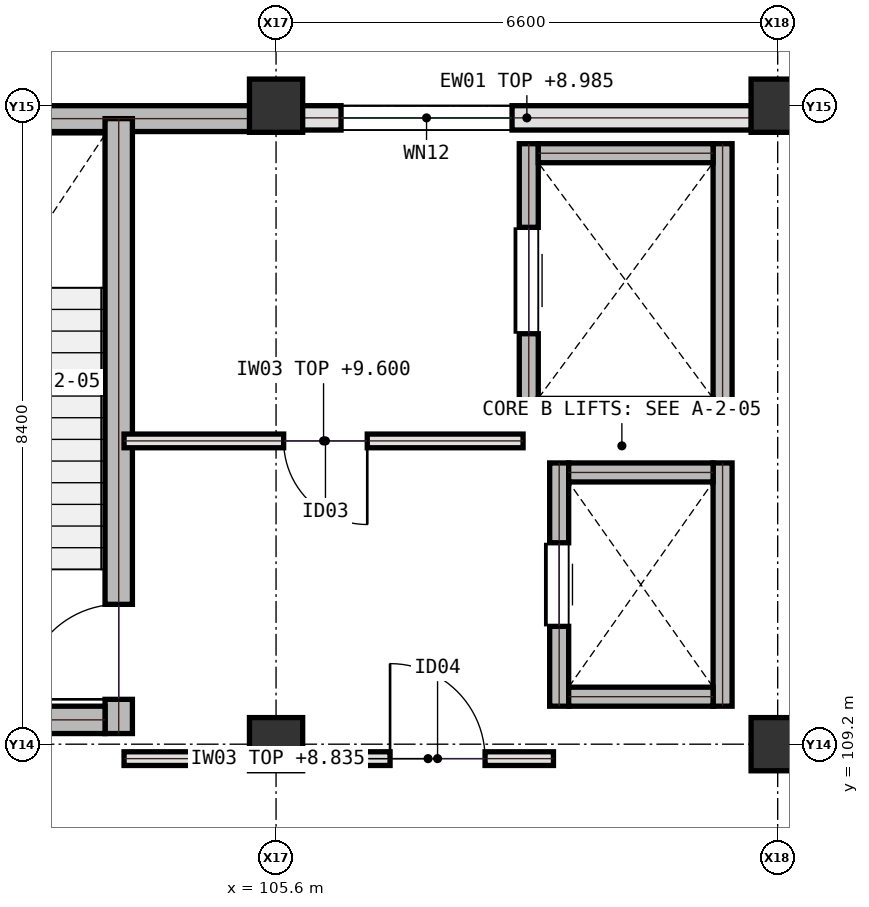
"""IFC4 building model, lengths in metres.
Left out: names, types, materials, properties, quantities, classifications, styles, units other than length and angle.
Written with IfcOpenShell. Run it as: python <this file> out.ifc"""

import sys

from ifc_helpers import new_model, si_unit, direction, frame, frame_2d, origin, origin_2d, place, context, subcontext, project, spatial, rectangle, extrude, element, fill, save


model = new_model("IFC4")
c1 = context("Model", 3, precision=1e-05, world=origin(), true_north=direction((0.0, 1.0)))
c2 = subcontext(c1, "Body", "Model", "MODEL_VIEW")
j1 = project(units=[si_unit("LENGTHUNIT", "METRE"), si_unit("PLANEANGLEUNIT", "RADIAN")], contexts=[c1])
p1 = place(None, origin())
s1 = spatial("IfcSite", under=j1, at=p1, CompositionType="ELEMENT")
p2 = place(p1, origin())
s2 = spatial("IfcBuilding", under=s1, at=p2, CompositionType="ELEMENT")
p3 = place(p2, frame((0.0, 0.0, 5.4)))
s3 = spatial("IfcBuildingStorey", under=s2, at=p3, CompositionType="ELEMENT", Elevation=5.4)
for number, where, z_axis, x_axis in (
    (1, (105.6, 109.2, 0.0), (0.0, 0.0, 1.0), (1.0, 0.0, 0.0)),
    (2, (105.6, 117.6, 0.0), (0.0, 0.0, 1.0), (1.0, 0.0, 0.0)),
    (3, (112.2, 109.2, 0.0), (0.0, 0.0, 1.0), (1.0, 0.0, 0.0)),
    (4, (112.2, 117.6, 0.0), (0.0, 0.0, 1.0), (1.0, 0.0, 0.0)),
):
    element("IfcColumn", number, at=place(p3, frame(where, z_axis=z_axis, x_axis=x_axis)), inside=s3, PredefinedType="COLUMN", context=c2, shape_type="SweptSolid", body=[
        extrude(rectangle(XDim=0.7, YDim=0.7, at=origin_2d()), origin(), (0.0, 0.0, 1.0), 4.5),
    ])
p4 = place(p3, frame((105.255, 117.43, 0.0), z_axis=(0.0, 0.0, 1.0), x_axis=(-1.0, 0.0, 0.0)))
e5 = element("IfcWall", 5, at=p4, inside=s3, PredefinedType="SHEAR", context=c2, shape_type="SweptSolid", body=[
    extrude(rectangle(XDim=5.91, YDim=0.34, at=frame_2d((2.955, 0.0))), origin(), (0.0, 0.0, 1.0), 4.2),
])
p5 = place(p3, frame((111.855, 117.44, 0.0), z_axis=(0.0, 0.0, 1.0), x_axis=(-1.0, 0.0, 0.0)))
e6 = element("IfcWall", 6, at=p5, inside=s3, PredefinedType="SOLIDWALL", context=c2, shape_type="SweptSolid", body=[
    extrude(rectangle(XDim=5.91, YDim=0.32, at=frame_2d((2.955, 0.0))), origin(), (0.0, 0.0, 1.0), 3.585),
])
p6 = place(p5, frame((3.15, 0.0, 0.95)))
e7 = element("IfcOpeningElement", 7, at=p6, cuts=e6, PredefinedType="OPENING", context=c2, shape_type="SweptSolid", body=[
    extrude(rectangle(XDim=2.25, YDim=1.55, at=frame_2d((1.125, 0.775))), frame((0.0, 0.17, 0.0), z_axis=(0.0, -1.0, 0.0), x_axis=(1.0, 0.0, 0.0)), (0.0, 0.0, 1.0), 0.34),
])
p7 = place(p3, frame((103.53, 109.34, 0.0), z_axis=(0.0, 0.0, 1.0), x_axis=(0.0, 1.0, 0.0)))
e8 = element("IfcWall", 8, at=p7, inside=s3, PredefinedType="SHEAR", context=c2, shape_type="SweptSolid", body=[
    extrude(rectangle(XDim=8.09, YDim=0.36, at=frame_2d((4.045, 0.0))), origin(), (0.0, 0.0, 1.0), 4.2),
])
p8 = place(p7, frame((0.45, 0.0, 0.0)))
e9 = element("IfcOpeningElement", 9, at=p8, cuts=e8, PredefinedType="OPENING", context=c2, shape_type="SweptSolid", body=[
    extrude(rectangle(XDim=1.25, YDim=2.15, at=frame_2d((0.625, 1.075))), frame((0.0, 0.19, 0.0), z_axis=(0.0, -1.0, 0.0), x_axis=(1.0, 0.0, 0.0)), (0.0, 0.0, 1.0), 0.38),
])
p9 = place(p3, frame((99.55, 109.52, 0.0), z_axis=(0.0, 0.0, 1.0), x_axis=(1.0, 0.0, 0.0)))
e10 = element("IfcWall", 10, at=p9, inside=s3, PredefinedType="SHEAR", context=c2, shape_type="SweptSolid", body=[
    extrude(rectangle(XDim=3.8, YDim=0.36, at=frame_2d((1.9, 0.0))), origin(), (0.0, 0.0, 1.0), 4.2),
])
p10 = place(p3, frame((109.325, 109.7, 0.0), z_axis=(0.0, 0.0, 1.0), x_axis=(0.0, 1.0, 0.0)))
e11 = element("IfcWall", 11, at=p10, inside=s3, PredefinedType="SHEAR", context=c2, shape_type="SweptSolid", body=[
    extrude(rectangle(XDim=3.2, YDim=0.25, at=frame_2d((1.6, 0.0))), origin(), (0.0, 0.0, 1.0), 4.2),
])
p11 = place(p10, frame((1.05, 0.0, 0.0)))
e12 = element("IfcOpeningElement", 12, at=p11, cuts=e11, PredefinedType="OPENING", context=c2, shape_type="SweptSolid", body=[
    extrude(rectangle(XDim=1.1, YDim=2.15, at=frame_2d((0.55, 1.075))), frame((0.0, 0.135, 0.0), z_axis=(0.0, -1.0, 0.0), x_axis=(1.0, 0.0, 0.0)), (0.0, 0.0, 1.0), 0.27),
])
p12 = place(p3, frame((111.475, 109.7, 0.0), z_axis=(0.0, 0.0, 1.0), x_axis=(0.0, 1.0, 0.0)))
e13 = element("IfcWall", 13, at=p12, inside=s3, PredefinedType="SHEAR", context=c2, shape_type="SweptSolid", body=[
    extrude(rectangle(XDim=3.2, YDim=0.25, at=frame_2d((1.6, 0.0))), origin(), (0.0, 0.0, 1.0), 4.2),
])
for number, where, z_axis, x_axis in (
    (14, (109.45, 109.825, 0.0), (0.0, 0.0, 1.0), (1.0, 0.0, 0.0)),
    (15, (109.45, 112.775, 0.0), (0.0, 0.0, 1.0), (1.0, 0.0, 0.0)),
):
    element("IfcWall", number, at=place(p3, frame(where, z_axis=z_axis, x_axis=x_axis)), inside=s3, PredefinedType="SHEAR", context=c2, shape_type="SweptSolid", body=[
        extrude(rectangle(XDim=1.9, YDim=0.25, at=frame_2d((0.95, 0.0))), origin(), (0.0, 0.0, 1.0), 4.2),
    ])
p13 = place(p3, frame((108.925, 113.5, 0.0), z_axis=(0.0, 0.0, 1.0), x_axis=(0.0, 1.0, 0.0)))
e16 = element("IfcWall", 16, at=p13, inside=s3, PredefinedType="SHEAR", context=c2, shape_type="SweptSolid", body=[
    extrude(rectangle(XDim=3.6, YDim=0.25, at=frame_2d((1.8, 0.0))), origin(), (0.0, 0.0, 1.0), 4.2),
])
p14 = place(p13, frame((1.1, 0.0, 0.0)))
e17 = element("IfcOpeningElement", 17, at=p14, cuts=e16, PredefinedType="OPENING", context=c2, shape_type="SweptSolid", body=[
    extrude(rectangle(XDim=1.4, YDim=2.2, at=frame_2d((0.7, 1.1))), frame((0.0, 0.135, 0.0), z_axis=(0.0, -1.0, 0.0), x_axis=(1.0, 0.0, 0.0)), (0.0, 0.0, 1.0), 0.27),
])
p15 = place(p3, frame((111.475, 113.5, 0.0), z_axis=(0.0, 0.0, 1.0), x_axis=(0.0, 1.0, 0.0)))
e18 = element("IfcWall", 18, at=p15, inside=s3, PredefinedType="SHEAR", context=c2, shape_type="SweptSolid", body=[
    extrude(rectangle(XDim=3.6, YDim=0.25, at=frame_2d((1.8, 0.0))), origin(), (0.0, 0.0, 1.0), 4.2),
])
for number, where, z_axis, x_axis in (
    (19, (109.05, 113.625, 0.0), (0.0, 0.0, 1.0), (1.0, 0.0, 0.0)),
    (20, (109.05, 116.975, 0.0), (0.0, 0.0, 1.0), (1.0, 0.0, 0.0)),
):
    element("IfcWall", number, at=place(p3, frame(where, z_axis=z_axis, x_axis=x_axis)), inside=s3, PredefinedType="SHEAR", context=c2, shape_type="SweptSolid", body=[
        extrude(rectangle(XDim=2.3, YDim=0.25, at=frame_2d((1.15, 0.0))), origin(), (0.0, 0.0, 1.0), 4.2),
    ])
p16 = place(p3, frame((103.6, 109.01, 0.0), z_axis=(0.0, 0.0, 1.0), x_axis=(1.0, 0.0, 0.0)))
e21 = element("IfcWall", 21, at=p16, inside=s3, PredefinedType="SOLIDWALL", context=c2, shape_type="SweptSolid", body=[
    extrude(rectangle(XDim=1.65, YDim=0.18, at=frame_2d((0.825, 0.0))), origin(), (0.0, 0.0, 1.0), 3.435),
])
p17 = place(p3, frame((105.95, 109.01, 0.0), z_axis=(0.0, 0.0, 1.0), x_axis=(1.0, 0.0, 0.0)))
e22 = element("IfcWall", 22, at=p17, inside=s3, PredefinedType="SOLIDWALL", context=c2, shape_type="SweptSolid", body=[
    extrude(rectangle(XDim=3.3, YDim=0.18, at=frame_2d((1.65, 0.0))), origin(), (0.0, 0.0, 1.0), 3.435),
])
p18 = place(p17, frame((1.15, 0.0, 0.0)))
e23 = element("IfcOpeningElement", 23, at=p18, cuts=e22, PredefinedType="OPENING", context=c2, shape_type="SweptSolid", body=[
    extrude(rectangle(XDim=1.25, YDim=2.15, at=frame_2d((0.625, 1.075))), frame((0.0, 0.1, 0.0), z_axis=(0.0, -1.0, 0.0), x_axis=(1.0, 0.0, 0.0)), (0.0, 0.0, 1.0), 0.2),
])
p19 = place(p3, frame((103.6, 113.19, 0.0), z_axis=(0.0, 0.0, 1.0), x_axis=(1.0, 0.0, 0.0)))
e24 = element("IfcWall", 24, at=p19, inside=s3, PredefinedType="SOLIDWALL", context=c2, shape_type="SweptSolid", body=[
    extrude(rectangle(XDim=5.25, YDim=0.18, at=frame_2d((2.625, 0.0))), origin(), (0.0, 0.0, 1.0), 4.2),
])
p20 = place(p19, frame((2.1, 0.0, 0.0)))
e25 = element("IfcOpeningElement", 25, at=p20, cuts=e24, PredefinedType="OPENING", context=c2, shape_type="SweptSolid", body=[
    extrude(rectangle(XDim=1.1, YDim=2.15, at=frame_2d((0.55, 1.075))), frame((0.0, 0.1, 0.0), z_axis=(0.0, -1.0, 0.0), x_axis=(1.0, 0.0, 0.0)), (0.0, 0.0, 1.0), 0.2),
])
p21 = place(p6, origin())
e26 = element("IfcWindow", 26, at=p21, inside=s3, PartitioningType="SINGLE_PANEL", PredefinedType="WINDOW", context=c2, shape_type="SweptSolid", body=[
    extrude(rectangle(XDim=2.25, YDim=1.55, at=frame_2d((1.125, 0.775))), frame((0.0, 0.03, 0.0), z_axis=(0.0, -1.0, 0.0), x_axis=(1.0, 0.0, 0.0)), (0.0, 0.0, 1.0), 0.06),
])
fill(e7, e26)
p22 = place(p8, origin())
e27 = element("IfcDoor", 27, at=p22, inside=s3, OperationType="SINGLE_SWING_LEFT", PredefinedType="DOOR", context=c2, shape_type="SweptSolid", body=[
    extrude(rectangle(XDim=1.25, YDim=2.15, at=frame_2d((0.625, 1.075))), frame((0.0, 0.025, 0.0), z_axis=(0.0, -1.0, 0.0), x_axis=(1.0, 0.0, 0.0)), (0.0, 0.0, 1.0), 0.05),
])
fill(e9, e27)
p23 = place(p11, origin())
e28 = element("IfcDoor", 28, at=p23, inside=s3, OperationType="SLIDING_TO_LEFT", PredefinedType="DOOR", context=c2, shape_type="SweptSolid", body=[
    extrude(rectangle(XDim=1.1, YDim=2.15, at=frame_2d((0.55, 1.075))), frame((0.0, 0.025, 0.0), z_axis=(0.0, -1.0, 0.0), x_axis=(1.0, 0.0, 0.0)), (0.0, 0.0, 1.0), 0.05),
])
fill(e12, e28)
p24 = place(p14, origin())
e29 = element("IfcDoor", 29, at=p24, inside=s3, OperationType="SLIDING_TO_LEFT", PredefinedType="DOOR", context=c2, shape_type="SweptSolid", body=[
    extrude(rectangle(XDim=1.4, YDim=2.2, at=frame_2d((0.7, 1.1))), frame((0.0, 0.025, 0.0), z_axis=(0.0, -1.0, 0.0), x_axis=(1.0, 0.0, 0.0)), (0.0, 0.0, 1.0), 0.05),
])
fill(e17, e29)
p25 = place(p18, origin())
e30 = element("IfcDoor", 30, at=p25, inside=s3, OperationType="SINGLE_SWING_LEFT", PredefinedType="DOOR", context=c2, shape_type="SweptSolid", body=[
    extrude(rectangle(XDim=1.25, YDim=2.15, at=frame_2d((0.625, 1.075))), frame((0.0, 0.025, 0.0), z_axis=(0.0, -1.0, 0.0), x_axis=(1.0, 0.0, 0.0)), (0.0, 0.0, 1.0), 0.05),
])
fill(e23, e30)
p26 = place(p20, frame((1.1, 0.0, 0.0), z_axis=(0.0, 0.0, 1.0), x_axis=(-1.0, 0.0, 0.0)))
e31 = element("IfcDoor", 31, at=p26, inside=s3, OperationType="SINGLE_SWING_RIGHT", PredefinedType="DOOR", context=c2, shape_type="SweptSolid", body=[
    extrude(rectangle(XDim=1.1, YDim=2.15, at=frame_2d((0.55, 1.075))), frame((0.0, 0.025, 0.0), z_axis=(0.0, -1.0, 0.0), x_axis=(1.0, 0.0, 0.0)), (0.0, 0.0, 1.0), 0.05),
])
fill(e25, e31)
save(model, sys.argv[1])
